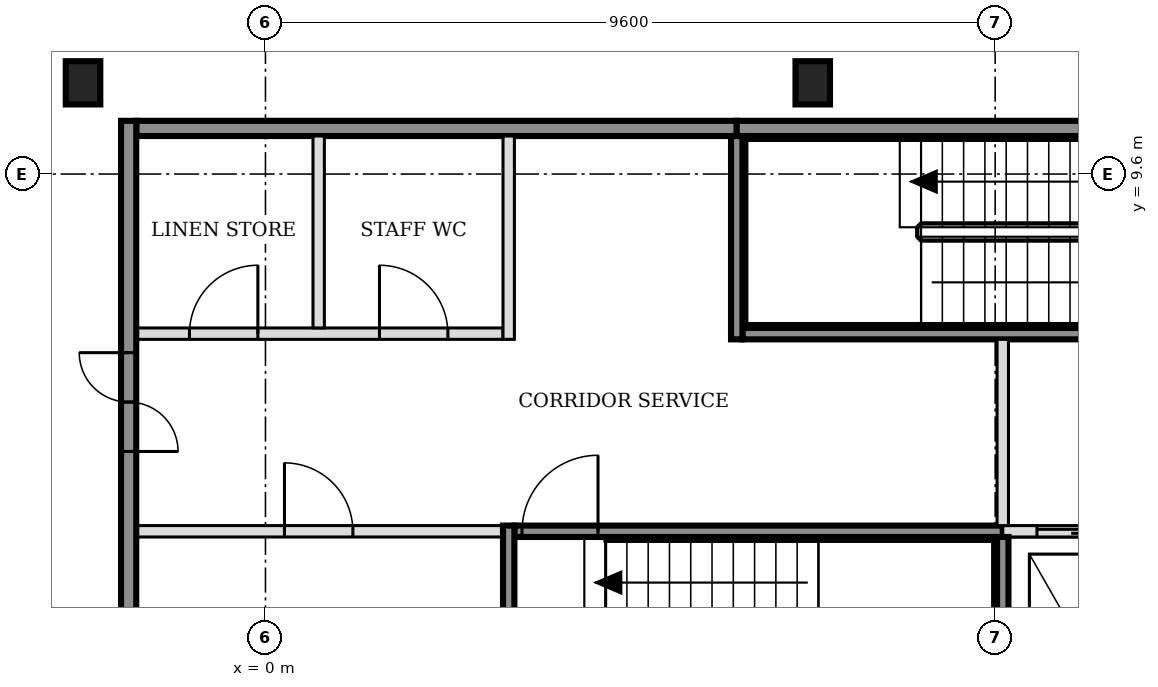
"""IFC4 building model, lengths in metres.
Left out: names, types, materials, properties, quantities, classifications, styles, units other than length and angle.
Written with IfcOpenShell. Run it as: python <this file> out.ifc"""

import sys

from ifc_helpers import new_model, si_unit, direction, frame, frame_2d, origin, origin_2d, place, context, subcontext, project, spatial, rectangle, i_section, extrude, element, fill, save


model = new_model("IFC4")
c1 = context("Model", 3, precision=1e-05, world=origin(), true_north=direction((0.0, 1.0)))
c2 = subcontext(c1, "Body", "Model", "MODEL_VIEW")
j1 = project(units=[si_unit("LENGTHUNIT", "METRE"), si_unit("PLANEANGLEUNIT", "RADIAN")], contexts=[c1])
p1 = place(None, origin())
s1 = spatial("IfcSite", under=j1, at=p1, CompositionType="ELEMENT")
p2 = place(p1, origin())
s2 = spatial("IfcBuilding", under=s1, at=p2, CompositionType="ELEMENT")
p3 = place(p2, frame((0.0, 0.0, 58.2)))
s3 = spatial("IfcBuildingStorey", under=s2, at=p3, CompositionType="ELEMENT", Elevation=58.2)
for number, where, z_axis, x_axis in (
    (1, (-2.4, 10.8, -0.15), (0.0, 0.0, 1.0), (1.0, 0.0, 0.0)),
    (2, (7.2, 10.8, -0.15), (0.0, 0.0, 1.0), (1.0, 0.0, 0.0)),
):
    element("IfcColumn", number, at=place(p3, frame(where, z_axis=z_axis, x_axis=x_axis)), inside=s3, PredefinedType="COLUMN", context=c2, shape_type="SweptSolid", body=[
        extrude(i_section(OverallWidth=0.454, OverallDepth=0.569, WebThickness=0.078, FlangeThickness=0.125, FilletRadius=0.015, at=origin_2d()), origin(), (0.0, 0.0, 1.0), 3.6),
    ])
p4 = place(p3, frame((-1.7, 4.9, 0.0), z_axis=(0.0, 0.0, 1.0), x_axis=(1.0, 0.0, 0.0)))
e3 = element("IfcWall", 3, at=p4, inside=s3, PredefinedType="PARTITIONING", context=c2, shape_type="SweptSolid", body=[
    extrude(rectangle(XDim=4.825, YDim=0.15, at=frame_2d((2.413, 0.0))), origin(), (0.0, 0.0, 1.0), 3.45),
])
p5 = place(p4, frame((1.95, 0.0, 0.0)))
e4 = element("IfcOpeningElement", 4, at=p5, cuts=e3, PredefinedType="OPENING", context=c2, shape_type="SweptSolid", body=[
    extrude(rectangle(XDim=0.9, YDim=2.1, at=frame_2d((0.45, 1.05))), frame((0.0, 0.085, 0.0), z_axis=(0.0, -1.0, 0.0), x_axis=(1.0, 0.0, 0.0)), (0.0, 0.0, 1.0), 0.17),
])
p6 = place(p3, frame((3.275, 4.9, 0.0), z_axis=(0.0, 0.0, 1.0), x_axis=(1.0, 0.0, 0.0)))
e5 = element("IfcWall", 5, at=p6, inside=s3, PredefinedType="SOLIDWALL", context=c2, shape_type="SweptSolid", body=[
    extrude(rectangle(XDim=6.425, YDim=0.15, at=frame_2d((3.212, 0.0))), origin(), (0.0, 0.0, 1.0), 3.45),
])
p7 = place(p6, frame((0.1, 0.0, 0.0)))
e6 = element("IfcOpeningElement", 6, at=p7, cuts=e5, PredefinedType="OPENING", context=c2, shape_type="SweptSolid", body=[
    extrude(rectangle(XDim=1.0, YDim=2.1, at=frame_2d((0.5, 1.05))), frame((0.0, 0.085, 0.0), z_axis=(0.0, -1.0, 0.0), x_axis=(1.0, 0.0, 0.0)), (0.0, 0.0, 1.0), 0.17),
])
p8 = place(p3, frame((9.7, 4.9, 0.0), z_axis=(0.0, 0.0, 1.0), x_axis=(1.0, 0.0, 0.0)))
e7 = element("IfcWall", 7, at=p8, inside=s3, PredefinedType="SOLIDWALL", context=c2, shape_type="SweptSolid", body=[
    extrude(rectangle(XDim=6.4, YDim=0.15, at=frame_2d((3.2, 0.0))), origin(), (0.0, 0.0, 1.0), 3.45),
])
p9 = place(p8, frame((0.45, 0.0, 0.0)))
e8 = element("IfcOpeningElement", 8, at=p9, cuts=e7, PredefinedType="OPENING", context=c2, shape_type="SweptSolid", body=[
    extrude(rectangle(XDim=1.0, YDim=2.1, at=frame_2d((0.5, 1.05))), frame((0.0, 0.085, 0.0), z_axis=(0.0, -1.0, 0.0), x_axis=(1.0, 0.0, 0.0)), (0.0, 0.0, 1.0), 0.17),
])
p10 = place(p8, frame((2.35, 0.0, 0.0)))
e9 = element("IfcOpeningElement", 9, at=p10, cuts=e7, PredefinedType="OPENING", context=c2, shape_type="SweptSolid", body=[
    extrude(rectangle(XDim=1.0, YDim=2.1, at=frame_2d((0.5, 1.05))), frame((0.0, 0.085, 0.0), z_axis=(0.0, -1.0, 0.0), x_axis=(1.0, 0.0, 0.0)), (0.0, 0.0, 1.0), 0.17),
])
p11 = place(p8, frame((4.7, 0.0, 0.0)))
e10 = element("IfcOpeningElement", 10, at=p11, cuts=e7, PredefinedType="OPENING", context=c2, shape_type="SweptSolid", body=[
    extrude(rectangle(XDim=0.9, YDim=2.1, at=frame_2d((0.45, 1.05))), frame((0.0, 0.085, 0.0), z_axis=(0.0, -1.0, 0.0), x_axis=(1.0, 0.0, 0.0)), (0.0, 0.0, 1.0), 0.17),
])
p12 = place(p3, frame((-1.7, 7.5, 0.0), z_axis=(0.0, 0.0, 1.0), x_axis=(1.0, 0.0, 0.0)))
e11 = element("IfcWall", 11, at=p12, inside=s3, PredefinedType="PARTITIONING", context=c2, shape_type="SweptSolid", body=[
    extrude(rectangle(XDim=4.825, YDim=0.15, at=frame_2d((2.413, 0.0))), origin(), (0.0, 0.0, 1.0), 3.45),
])
p13 = place(p12, frame((0.7, 0.0, 0.0)))
e12 = element("IfcOpeningElement", 12, at=p13, cuts=e11, PredefinedType="OPENING", context=c2, shape_type="SweptSolid", body=[
    extrude(rectangle(XDim=0.9, YDim=2.1, at=frame_2d((0.45, 1.05))), frame((0.0, 0.085, 0.0), z_axis=(0.0, -1.0, 0.0), x_axis=(1.0, 0.0, 0.0)), (0.0, 0.0, 1.0), 0.17),
])
p14 = place(p12, frame((3.2, 0.0, 0.0)))
e13 = element("IfcOpeningElement", 13, at=p14, cuts=e11, PredefinedType="OPENING", context=c2, shape_type="SweptSolid", body=[
    extrude(rectangle(XDim=0.9, YDim=2.1, at=frame_2d((0.45, 1.05))), frame((0.0, 0.085, 0.0), z_axis=(0.0, -1.0, 0.0), x_axis=(1.0, 0.0, 0.0)), (0.0, 0.0, 1.0), 0.17),
])
p15 = place(p3, frame((6.275, 7.5, 0.0), z_axis=(0.0, 0.0, 1.0), x_axis=(1.0, 0.0, 0.0)))
e14 = element("IfcWall", 14, at=p15, inside=s3, PredefinedType="SOLIDWALL", context=c2, shape_type="SweptSolid", body=[
    extrude(rectangle(XDim=6.425, YDim=0.15, at=frame_2d((3.212, 0.0))), origin(), (0.0, 0.0, 1.0), 3.45),
])
p16 = place(p15, frame((5.225, 0.0, 0.0)))
e15 = element("IfcOpeningElement", 15, at=p16, cuts=e14, PredefinedType="OPENING", context=c2, shape_type="SweptSolid", body=[
    extrude(rectangle(XDim=1.0, YDim=2.1, at=frame_2d((0.5, 1.05))), frame((0.0, 0.085, 0.0), z_axis=(0.0, -1.0, 0.0), x_axis=(1.0, 0.0, 0.0)), (0.0, 0.0, 1.0), 0.17),
])
p17 = place(p3, frame((-1.7, 10.2, 0.0), z_axis=(0.0, 0.0, 1.0), x_axis=(1.0, 0.0, 0.0)))
e16 = element("IfcWall", 16, at=p17, inside=s3, PredefinedType="SOLIDWALL", context=c2, shape_type="SweptSolid", body=[
    extrude(rectangle(XDim=7.9, YDim=0.2, at=frame_2d((3.95, 0.0))), origin(), (0.0, 0.0, 1.0), 3.45),
])
p18 = place(p3, frame((6.2, 10.2, 0.0), z_axis=(0.0, 0.0, 1.0), x_axis=(1.0, 0.0, 0.0)))
e17 = element("IfcWall", 17, at=p18, inside=s3, PredefinedType="SOLIDWALL", context=c2, shape_type="SweptSolid", body=[
    extrude(rectangle(XDim=6.5, YDim=0.2, at=frame_2d((3.25, 0.0))), origin(), (0.0, 0.0, 1.0), 3.45),
])
p19 = place(p3, frame((-1.8, -5.5, 0.0), z_axis=(0.0, 0.0, 1.0), x_axis=(0.0, 1.0, 0.0)))
e18 = element("IfcWall", 18, at=p19, inside=s3, PredefinedType="SOLIDWALL", context=c2, shape_type="SweptSolid", body=[
    extrude(rectangle(XDim=15.8, YDim=0.2, at=frame_2d((7.9, 0.0))), origin(), (0.0, 0.0, 1.0), 3.45),
])
p20 = place(p19, frame((3.05, 0.0, 0.0)))
e19 = element("IfcOpeningElement", 19, at=p20, cuts=e18, PredefinedType="OPENING", context=c2, shape_type="SweptSolid", body=[
    extrude(rectangle(XDim=1.3, YDim=2.1, at=frame_2d((0.65, 1.05))), frame((0.0, 0.11, 0.0), z_axis=(0.0, -1.0, 0.0), x_axis=(1.0, 0.0, 0.0)), (0.0, 0.0, 1.0), 0.22),
])
p21 = place(p19, frame((11.45, 0.0, 0.0)))
e20 = element("IfcOpeningElement", 20, at=p21, cuts=e18, PredefinedType="OPENING", context=c2, shape_type="SweptSolid", body=[
    extrude(rectangle(XDim=1.3, YDim=2.1, at=frame_2d((0.65, 1.05))), frame((0.0, 0.11, 0.0), z_axis=(0.0, -1.0, 0.0), x_axis=(1.0, 0.0, 0.0)), (0.0, 0.0, 1.0), 0.22),
])
p22 = place(p3, frame((0.7, 7.575, 0.0), z_axis=(0.0, 0.0, 1.0), x_axis=(0.0, 1.0, 0.0)))
e21 = element("IfcWall", 21, at=p22, inside=s3, PredefinedType="PARTITIONING", context=c2, shape_type="SweptSolid", body=[
    extrude(rectangle(XDim=2.525, YDim=0.15, at=frame_2d((1.263, 0.0))), origin(), (0.0, 0.0, 1.0), 3.45),
])
p23 = place(p3, frame((3.2, 2.275, 0.0), z_axis=(0.0, 0.0, 1.0), x_axis=(0.0, 1.0, 0.0)))
e22 = element("IfcWall", 22, at=p23, inside=s3, PredefinedType="SOLIDWALL", context=c2, shape_type="SweptSolid", body=[
    extrude(rectangle(XDim=2.7, YDim=0.15, at=frame_2d((1.35, 0.0))), origin(), (0.0, 0.0, 1.0), 3.45),
])
p24 = place(p3, frame((3.2, 7.425, 0.0), z_axis=(0.0, 0.0, 1.0), x_axis=(0.0, 1.0, 0.0)))
e23 = element("IfcWall", 23, at=p24, inside=s3, PredefinedType="PARTITIONING", context=c2, shape_type="SweptSolid", body=[
    extrude(rectangle(XDim=2.675, YDim=0.15, at=frame_2d((1.337, 0.0))), origin(), (0.0, 0.0, 1.0), 3.45),
])
p25 = place(p3, frame((6.2, 7.425, 0.0), z_axis=(0.0, 0.0, 1.0), x_axis=(0.0, 1.0, 0.0)))
e24 = element("IfcWall", 24, at=p25, inside=s3, PredefinedType="SOLIDWALL", context=c2, shape_type="SweptSolid", body=[
    extrude(rectangle(XDim=2.675, YDim=0.15, at=frame_2d((1.337, 0.0))), origin(), (0.0, 0.0, 1.0), 3.45),
])
p26 = place(p3, frame((9.7, 2.275, 0.0), z_axis=(0.0, 0.0, 1.0), x_axis=(0.0, 1.0, 0.0)))
e25 = element("IfcWall", 25, at=p26, inside=s3, PredefinedType="SOLIDWALL", context=c2, shape_type="SweptSolid", body=[
    extrude(rectangle(XDim=2.55, YDim=0.15, at=frame_2d((1.275, 0.0))), origin(), (0.0, 0.0, 1.0), 3.45),
])
p27 = place(p3, frame((9.7, 4.975, 0.0), z_axis=(0.0, 0.0, 1.0), x_axis=(0.0, 1.0, 0.0)))
e26 = element("IfcWall", 26, at=p27, inside=s3, PredefinedType="SOLIDWALL", context=c2, shape_type="SweptSolid", body=[
    extrude(rectangle(XDim=2.45, YDim=0.15, at=frame_2d((1.225, 0.0))), origin(), (0.0, 0.0, 1.0), 3.45),
])
p28 = place(p9, origin())
e27 = element("IfcDoor", 27, at=p28, inside=s3, OperationType="DOUBLE_DOOR_SLIDING", PredefinedType="DOOR", context=c2, shape_type="SweptSolid", body=[
    extrude(rectangle(XDim=1.0, YDim=2.1, at=frame_2d((0.5, 1.05))), frame((0.0, 0.025, 0.0), z_axis=(0.0, -1.0, 0.0), x_axis=(1.0, 0.0, 0.0)), (0.0, 0.0, 1.0), 0.05),
])
fill(e8, e27)
p29 = place(p7, origin())
e28 = element("IfcDoor", 28, at=p29, inside=s3, OperationType="SINGLE_SWING_RIGHT", PredefinedType="DOOR", context=c2, shape_type="SweptSolid", body=[
    extrude(rectangle(XDim=1.0, YDim=2.1, at=frame_2d((0.5, 1.05))), frame((0.0, 0.025, 0.0), z_axis=(0.0, -1.0, 0.0), x_axis=(1.0, 0.0, 0.0)), (0.0, 0.0, 1.0), 0.05),
])
fill(e6, e28)
p30 = place(p21, origin())
e29 = element("IfcDoor", 29, at=p30, inside=s3, OperationType="DOUBLE_DOOR_SINGLE_SWING", PredefinedType="DOOR", context=c2, shape_type="SweptSolid", body=[
    extrude(rectangle(XDim=1.3, YDim=2.1, at=frame_2d((0.65, 1.05))), frame((0.0, 0.025, 0.0), z_axis=(0.0, -1.0, 0.0), x_axis=(1.0, 0.0, 0.0)), (0.0, 0.0, 1.0), 0.05),
])
fill(e20, e29)
p31 = place(p5, origin())
e30 = element("IfcDoor", 30, at=p31, inside=s3, OperationType="SINGLE_SWING_LEFT", PredefinedType="DOOR", context=c2, shape_type="SweptSolid", body=[
    extrude(rectangle(XDim=0.9, YDim=2.1, at=frame_2d((0.45, 1.05))), frame((0.0, 0.025, 0.0), z_axis=(0.0, -1.0, 0.0), x_axis=(1.0, 0.0, 0.0)), (0.0, 0.0, 1.0), 0.05),
])
fill(e4, e30)
p32 = place(p13, origin())
e31 = element("IfcDoor", 31, at=p32, inside=s3, OperationType="SINGLE_SWING_RIGHT", PredefinedType="DOOR", context=c2, shape_type="SweptSolid", body=[
    extrude(rectangle(XDim=0.9, YDim=2.1, at=frame_2d((0.45, 1.05))), frame((0.0, 0.025, 0.0), z_axis=(0.0, -1.0, 0.0), x_axis=(1.0, 0.0, 0.0)), (0.0, 0.0, 1.0), 0.05),
])
fill(e12, e31)
p33 = place(p14, origin())
e32 = element("IfcDoor", 32, at=p33, inside=s3, OperationType="SINGLE_SWING_LEFT", PredefinedType="DOOR", context=c2, shape_type="SweptSolid", body=[
    extrude(rectangle(XDim=0.9, YDim=2.1, at=frame_2d((0.45, 1.05))), frame((0.0, 0.025, 0.0), z_axis=(0.0, -1.0, 0.0), x_axis=(1.0, 0.0, 0.0)), (0.0, 0.0, 1.0), 0.05),
])
fill(e13, e32)
save(model, sys.argv[1])
